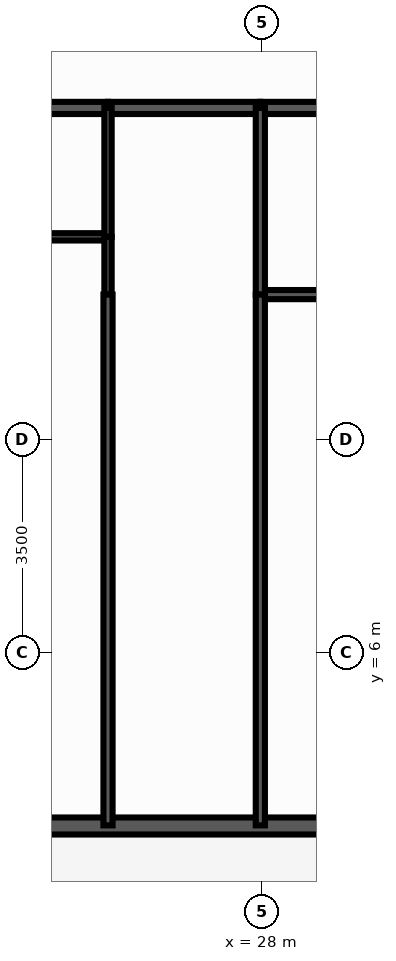
"""IFC4 building model, lengths in metres.
Left out: names, types, materials, properties, quantities, classifications, styles, units other than length and angle.
Written with IfcOpenShell. Run it as: python <this file> out.ifc"""

import sys

from ifc_helpers import new_model, si_unit, direction, frame, frame_2d, origin, origin_2d, place, context, subcontext, project, spatial, rectangle, extrude, source, transform, mapped, element, fill, save


model = new_model("IFC4")
c1 = context("Model", 3, precision=1e-05, world=origin(), true_north=direction((0.0, 1.0)))
c2 = subcontext(c1, "Body", "Model", "MODEL_VIEW")
j1 = project(units=[si_unit("LENGTHUNIT", "METRE"), si_unit("PLANEANGLEUNIT", "RADIAN")], contexts=[c1])
p1 = place(None, origin())
s1 = spatial("IfcSite", under=j1, at=p1, CompositionType="ELEMENT")
p2 = place(p1, origin())
s2 = spatial("IfcBuilding", under=s1, at=p2, CompositionType="ELEMENT")
p3 = place(p2, frame((0.0, 0.0, 19.4)))
s3 = spatial("IfcBuildingStorey", under=s2, at=p3, CompositionType="ELEMENT", Elevation=19.4)
p4 = place(p3, frame((15.5, 3.14, 0.0), z_axis=(0.0, 0.0, 1.0), x_axis=(1.0, 0.0, 0.0)))
e1 = element("IfcWall", 1, at=p4, inside=s3, PredefinedType="SOLIDWALL", context=c2, shape_type="SweptSolid", body=[
    extrude(rectangle(XDim=45.0, YDim=0.28, at=frame_2d((22.5, 0.0))), origin(), (0.0, 0.0, 1.0), 2.28),
])
p5 = place(p4, frame((0.785, 0.0, 0.25)))
e2 = element("IfcOpeningElement", 2, at=p5, cuts=e1, PredefinedType="OPENING", context=c2, shape_type="SweptSolid", body=[
    extrude(rectangle(XDim=1.2, YDim=1.5, at=frame_2d((0.6, 0.75))), frame((0.0, 0.152, 0.0), z_axis=(0.0, -1.0, 0.0), x_axis=(1.0, 0.0, 0.0)), (0.0, 0.0, 1.0), 0.304),
])
p6 = place(p4, frame((3.033, 0.0, 0.25)))
e3 = element("IfcOpeningElement", 3, at=p6, cuts=e1, PredefinedType="OPENING", context=c2, shape_type="SweptSolid", body=[
    extrude(rectangle(XDim=1.2, YDim=1.5, at=frame_2d((0.6, 0.75))), frame((0.0, 0.152, 0.0), z_axis=(0.0, -1.0, 0.0), x_axis=(1.0, 0.0, 0.0)), (0.0, 0.0, 1.0), 0.304),
])
p7 = place(p4, frame((5.727, 0.0, 0.25)))
e4 = element("IfcOpeningElement", 4, at=p7, cuts=e1, PredefinedType="OPENING", context=c2, shape_type="SweptSolid", body=[
    extrude(rectangle(XDim=1.2, YDim=1.5, at=frame_2d((0.6, 0.75))), frame((0.0, 0.152, 0.0), z_axis=(0.0, -1.0, 0.0), x_axis=(1.0, 0.0, 0.0)), (0.0, 0.0, 1.0), 0.304),
])
p8 = place(p4, frame((8.269, 0.0, 0.25)))
e5 = element("IfcOpeningElement", 5, at=p8, cuts=e1, PredefinedType="OPENING", context=c2, shape_type="SweptSolid", body=[
    extrude(rectangle(XDim=1.2, YDim=1.5, at=frame_2d((0.6, 0.75))), frame((0.0, 0.152, 0.0), z_axis=(0.0, -1.0, 0.0), x_axis=(1.0, 0.0, 0.0)), (0.0, 0.0, 1.0), 0.304),
])
p9 = place(p4, frame((10.621, 0.0, 0.25)))
e6 = element("IfcOpeningElement", 6, at=p9, cuts=e1, PredefinedType="OPENING", context=c2, shape_type="SweptSolid", body=[
    extrude(rectangle(XDim=1.2, YDim=1.5, at=frame_2d((0.6, 0.75))), frame((0.0, 0.152, 0.0), z_axis=(0.0, -1.0, 0.0), x_axis=(1.0, 0.0, 0.0)), (0.0, 0.0, 1.0), 0.304),
])
p10 = place(p4, frame((13.316, 0.0, 0.25)))
e7 = element("IfcOpeningElement", 7, at=p10, cuts=e1, PredefinedType="OPENING", context=c2, shape_type="SweptSolid", body=[
    extrude(rectangle(XDim=1.2, YDim=1.5, at=frame_2d((0.6, 0.75))), frame((0.0, 0.152, 0.0), z_axis=(0.0, -1.0, 0.0), x_axis=(1.0, 0.0, 0.0)), (0.0, 0.0, 1.0), 0.304),
])
p11 = place(p4, frame((16.624, 0.0, 0.25)))
e8 = element("IfcOpeningElement", 8, at=p11, cuts=e1, PredefinedType="OPENING", context=c2, shape_type="SweptSolid", body=[
    extrude(rectangle(XDim=0.7, YDim=1.5, at=frame_2d((0.35, 0.75))), frame((0.0, 0.152, 0.0), z_axis=(0.0, -1.0, 0.0), x_axis=(1.0, 0.0, 0.0)), (0.0, 0.0, 1.0), 0.304),
])
p12 = place(p4, frame((18.141, 0.0, 0.25)))
e9 = element("IfcOpeningElement", 9, at=p12, cuts=e1, PredefinedType="OPENING", context=c2, shape_type="SweptSolid", body=[
    extrude(rectangle(XDim=1.2, YDim=1.5, at=frame_2d((0.6, 0.75))), frame((0.0, 0.152, 0.0), z_axis=(0.0, -1.0, 0.0), x_axis=(1.0, 0.0, 0.0)), (0.0, 0.0, 1.0), 0.304),
])
p13 = place(p4, frame((21.874, 0.0, 0.0), z_axis=(0.0, 0.0, 1.0), x_axis=(-1.0, 0.0, 0.0)))
e10 = element("IfcOpeningElement", 10, at=p13, cuts=e1, PredefinedType="OPENING", context=c2, shape_type="SweptSolid", body=[
    extrude(rectangle(XDim=1.1, YDim=2.15, at=frame_2d((0.55, 1.075))), frame((0.0, 0.152, 0.0), z_axis=(0.0, -1.0, 0.0), x_axis=(1.0, 0.0, 0.0)), (0.0, 0.0, 1.0), 0.304),
])
p14 = place(p4, frame((23.223, 0.0, 0.25)))
e11 = element("IfcOpeningElement", 11, at=p14, cuts=e1, PredefinedType="OPENING", context=c2, shape_type="SweptSolid", body=[
    extrude(rectangle(XDim=1.2, YDim=1.5, at=frame_2d((0.6, 0.75))), frame((0.0, 0.152, 0.0), z_axis=(0.0, -1.0, 0.0), x_axis=(1.0, 0.0, 0.0)), (0.0, 0.0, 1.0), 0.304),
])
p15 = place(p4, frame((25.507, 0.0, 0.25)))
e12 = element("IfcOpeningElement", 12, at=p15, cuts=e1, PredefinedType="OPENING", context=c2, shape_type="SweptSolid", body=[
    extrude(rectangle(XDim=1.2, YDim=1.5, at=frame_2d((0.6, 0.75))), frame((0.0, 0.152, 0.0), z_axis=(0.0, -1.0, 0.0), x_axis=(1.0, 0.0, 0.0)), (0.0, 0.0, 1.0), 0.304),
])
p16 = place(p4, frame((27.6, 0.0, 0.25)))
e13 = element("IfcOpeningElement", 13, at=p16, cuts=e1, PredefinedType="OPENING", context=c2, shape_type="SweptSolid", body=[
    extrude(rectangle(XDim=0.7, YDim=1.5, at=frame_2d((0.35, 0.75))), frame((0.0, 0.152, 0.0), z_axis=(0.0, -1.0, 0.0), x_axis=(1.0, 0.0, 0.0)), (0.0, 0.0, 1.0), 0.304),
])
p17 = place(p4, frame((30.589, 0.0, 0.25)))
e14 = element("IfcOpeningElement", 14, at=p17, cuts=e1, PredefinedType="OPENING", context=c2, shape_type="SweptSolid", body=[
    extrude(rectangle(XDim=1.2, YDim=1.5, at=frame_2d((0.6, 0.75))), frame((0.0, 0.152, 0.0), z_axis=(0.0, -1.0, 0.0), x_axis=(1.0, 0.0, 0.0)), (0.0, 0.0, 1.0), 0.304),
])
p18 = place(p4, frame((32.872, 0.0, 0.25)))
e15 = element("IfcOpeningElement", 15, at=p18, cuts=e1, PredefinedType="OPENING", context=c2, shape_type="SweptSolid", body=[
    extrude(rectangle(XDim=1.2, YDim=1.5, at=frame_2d((0.6, 0.75))), frame((0.0, 0.152, 0.0), z_axis=(0.0, -1.0, 0.0), x_axis=(1.0, 0.0, 0.0)), (0.0, 0.0, 1.0), 0.304),
])
p19 = place(p4, frame((35.455, 0.0, 0.25)))
e16 = element("IfcOpeningElement", 16, at=p19, cuts=e1, PredefinedType="OPENING", context=c2, shape_type="SweptSolid", body=[
    extrude(rectangle(XDim=1.2, YDim=1.5, at=frame_2d((0.6, 0.75))), frame((0.0, 0.152, 0.0), z_axis=(0.0, -1.0, 0.0), x_axis=(1.0, 0.0, 0.0)), (0.0, 0.0, 1.0), 0.304),
])
p20 = place(p4, frame((37.954, 0.0, 0.25)))
e17 = element("IfcOpeningElement", 17, at=p20, cuts=e1, PredefinedType="OPENING", context=c2, shape_type="SweptSolid", body=[
    extrude(rectangle(XDim=1.2, YDim=1.5, at=frame_2d((0.6, 0.75))), frame((0.0, 0.152, 0.0), z_axis=(0.0, -1.0, 0.0), x_axis=(1.0, 0.0, 0.0)), (0.0, 0.0, 1.0), 0.304),
])
p21 = place(p4, frame((40.238, 0.0, 0.25)))
e18 = element("IfcOpeningElement", 18, at=p21, cuts=e1, PredefinedType="OPENING", context=c2, shape_type="SweptSolid", body=[
    extrude(rectangle(XDim=1.2, YDim=1.5, at=frame_2d((0.6, 0.75))), frame((0.0, 0.152, 0.0), z_axis=(0.0, -1.0, 0.0), x_axis=(1.0, 0.0, 0.0)), (0.0, 0.0, 1.0), 0.304),
])
p22 = place(p4, frame((42.716, 0.0, 0.25)))
e19 = element("IfcOpeningElement", 19, at=p22, cuts=e1, PredefinedType="OPENING", context=c2, shape_type="SweptSolid", body=[
    extrude(rectangle(XDim=1.2, YDim=1.5, at=frame_2d((0.6, 0.75))), frame((0.0, 0.152, 0.0), z_axis=(0.0, -1.0, 0.0), x_axis=(1.0, 0.0, 0.0)), (0.0, 0.0, 1.0), 0.304),
])
p23 = place(p3, frame((23.269, 14.95, 0.0), z_axis=(0.0, 0.0, 1.0), x_axis=(1.0, 0.0, 0.0)))
e20 = element("IfcWall", 20, at=p23, inside=s3, PredefinedType="PARTITIONING", context=c2, shape_type="SweptSolid", body=[
    extrude(rectangle(XDim=2.2, YDim=0.2, at=frame_2d((1.1, 0.0))), origin(), (0.0, 0.0, 1.0), 2.79),
])
p24 = place(p3, frame((25.469, 14.95, 0.0), z_axis=(0.0, 0.0, 1.0), x_axis=(1.0, 0.0, 0.0)))
e21 = element("IfcWall", 21, at=p24, inside=s3, PredefinedType="PARTITIONING", context=c2, shape_type="SweptSolid", body=[
    extrude(rectangle(XDim=2.505, YDim=0.2, at=frame_2d((1.252, 0.0))), origin(), (0.0, 0.0, 1.0), 2.79),
])
p25 = place(p24, frame((0.752, 0.0, 0.0)))
e22 = element("IfcOpeningElement", 22, at=p25, cuts=e21, PredefinedType="OPENING", context=c2, shape_type="SweptSolid", body=[
    extrude(rectangle(XDim=1.0, YDim=2.15, at=frame_2d((0.5, 1.075))), frame((0.0, 0.112, 0.0), z_axis=(0.0, -1.0, 0.0), x_axis=(1.0, 0.0, 0.0)), (0.0, 0.0, 1.0), 0.224),
])
p26 = place(p3, frame((27.974, 14.95, 0.0), z_axis=(0.0, 0.0, 1.0), x_axis=(1.0, 0.0, 0.0)))
e23 = element("IfcWall", 23, at=p26, inside=s3, PredefinedType="PARTITIONING", context=c2, shape_type="SweptSolid", body=[
    extrude(rectangle(XDim=2.884, YDim=0.2, at=frame_2d((1.442, 0.0))), origin(), (0.0, 0.0, 1.0), 2.79),
])
p27 = place(p3, frame((23.269, 12.83, 0.0), z_axis=(0.0, 0.0, 1.0), x_axis=(1.0, 0.0, 0.0)))
e24 = element("IfcWall", 24, at=p27, inside=s3, PredefinedType="PARTITIONING", context=c2, shape_type="SweptSolid", body=[
    extrude(rectangle(XDim=2.2, YDim=0.12, at=frame_2d((1.1, 0.0))), origin(), (0.0, 0.0, 1.0), 2.79),
])
p28 = place(p3, frame((27.974, 11.88, 0.0), z_axis=(0.0, 0.0, 1.0), x_axis=(1.0, 0.0, 0.0)))
e25 = element("IfcWall", 25, at=p28, inside=s3, PredefinedType="PARTITIONING", context=c2, shape_type="SweptSolid", body=[
    extrude(rectangle(XDim=2.884, YDim=0.15, at=frame_2d((1.442, 0.0))), origin(), (0.0, 0.0, 1.0), 2.79),
])
p29 = place(p3, frame((25.469, 14.95, 0.0), z_axis=(0.0, 0.0, 1.0), x_axis=(0.0, -1.0, 0.0)))
e26 = element("IfcWall", 26, at=p29, inside=s3, PredefinedType="PARTITIONING", context=c2, shape_type="SweptSolid", body=[
    extrude(rectangle(XDim=2.12, YDim=0.12, at=frame_2d((1.06, 0.0))), origin(), (0.0, 0.0, 1.0), 2.79),
])
p30 = place(p29, frame((0.635, 0.0, 0.0)))
e27 = element("IfcOpeningElement", 27, at=p30, cuts=e26, PredefinedType="OPENING", context=c2, shape_type="SweptSolid", body=[
    extrude(rectangle(XDim=0.85, YDim=2.05, at=frame_2d((0.425, 1.025))), frame((0.0, 0.072, 0.0), z_axis=(0.0, -1.0, 0.0), x_axis=(1.0, 0.0, 0.0)), (0.0, 0.0, 1.0), 0.144),
])
p31 = place(p3, frame((25.469, 12.83, 0.0), z_axis=(0.0, 0.0, 1.0), x_axis=(0.0, -1.0, 0.0)))
e28 = element("IfcWall", 28, at=p31, inside=s3, PredefinedType="PARTITIONING", context=c2, shape_type="SweptSolid", body=[
    extrude(rectangle(XDim=0.95, YDim=0.12, at=frame_2d((0.475, 0.0))), origin(), (0.0, 0.0, 1.0), 2.79),
])
p32 = place(p3, frame((25.469, 11.88, 0.0), z_axis=(0.0, 0.0, 1.0), x_axis=(0.0, -1.0, 0.0)))
e29 = element("IfcWall", 29, at=p32, inside=s3, PredefinedType="PARTITIONING", context=c2, shape_type="SweptSolid", body=[
    extrude(rectangle(XDim=8.73, YDim=0.15, at=frame_2d((4.365, 0.0))), origin(), (0.0, 0.0, 1.0), 2.79),
])
p33 = place(p32, frame((3.609, 0.0, 0.0)))
e30 = element("IfcOpeningElement", 30, at=p33, cuts=e29, PredefinedType="OPENING", context=c2, shape_type="SweptSolid", body=[
    extrude(rectangle(XDim=0.9, YDim=2.1, at=frame_2d((0.45, 1.05))), frame((0.0, 0.087, 0.0), z_axis=(0.0, -1.0, 0.0), x_axis=(1.0, 0.0, 0.0)), (0.0, 0.0, 1.0), 0.174),
])
p34 = place(p3, frame((27.974, 14.95, 0.0), z_axis=(0.0, 0.0, 1.0), x_axis=(0.0, -1.0, 0.0)))
e31 = element("IfcWall", 31, at=p34, inside=s3, PredefinedType="PARTITIONING", context=c2, shape_type="SweptSolid", body=[
    extrude(rectangle(XDim=3.07, YDim=0.15, at=frame_2d((1.535, 0.0))), origin(), (0.0, 0.0, 1.0), 2.79),
])
p35 = place(p34, frame((1.085, 0.0, 0.0)))
e32 = element("IfcOpeningElement", 32, at=p35, cuts=e31, PredefinedType="OPENING", context=c2, shape_type="SweptSolid", body=[
    extrude(rectangle(XDim=0.9, YDim=2.1, at=frame_2d((0.45, 1.05))), frame((0.0, 0.087, 0.0), z_axis=(0.0, -1.0, 0.0), x_axis=(1.0, 0.0, 0.0)), (0.0, 0.0, 1.0), 0.174),
])
p36 = place(p3, frame((27.974, 11.88, 0.0), z_axis=(0.0, 0.0, 1.0), x_axis=(0.0, -1.0, 0.0)))
e33 = element("IfcWall", 33, at=p36, inside=s3, PredefinedType="PARTITIONING", context=c2, shape_type="SweptSolid", body=[
    extrude(rectangle(XDim=8.73, YDim=0.15, at=frame_2d((4.365, 0.0))), origin(), (0.0, 0.0, 1.0), 2.79),
])
p37 = place(p36, frame((3.609, 0.0, 0.0)))
e34 = element("IfcOpeningElement", 34, at=p37, cuts=e33, PredefinedType="OPENING", context=c2, shape_type="SweptSolid", body=[
    extrude(rectangle(XDim=0.9, YDim=2.1, at=frame_2d((0.45, 1.05))), frame((0.0, 0.087, 0.0), z_axis=(0.0, -1.0, 0.0), x_axis=(1.0, 0.0, 0.0)), (0.0, 0.0, 1.0), 0.174),
])
p38 = place(p3, frame((0.0, 0.0, -0.32)))
p39 = place(p38, frame((28.0, 1.25, 0.0)))
p40 = place(p39, frame((0.0, 0.0, 0.27)))
e35 = element("IfcWindow", 35, at=p40, inside=s3, PartitioningType="SINGLE_PANEL", PredefinedType="SKYLIGHT", context=c2, shape_type="SweptSolid", body=[
    extrude(rectangle(XDim=2.2, YDim=2.2, at=origin_2d()), origin(), (0.0, 0.0, 1.0), 0.05),
])
m1 = source(origin(), c2, "Body", "SweptSolid", [
    extrude(rectangle(XDim=1.2, YDim=1.5, at=frame_2d((0.6, 0.75))), frame((0.0, 0.03, 0.0), z_axis=(0.0, -1.0, 0.0), x_axis=(1.0, 0.0, 0.0)), (0.0, 0.0, 1.0), 0.06),
])
p41 = place(p8, origin())
e36 = element("IfcWindow", 36, at=p41, inside=s3, PartitioningType="SINGLE_PANEL", PredefinedType="WINDOW", context=c2, shape_type="MappedRepresentation", body=[
    mapped(m1, transform((0.0, 0.0, 0.0), scale=1.0)),
])
fill(e5, e36)
p42 = place(p9, origin())
e37 = element("IfcWindow", 37, at=p42, inside=s3, PartitioningType="SINGLE_PANEL", PredefinedType="WINDOW", context=c2, shape_type="MappedRepresentation", body=[
    mapped(m1, transform((0.0, 0.0, 0.0), scale=1.0)),
])
fill(e6, e37)
p43 = place(p10, origin())
e38 = element("IfcWindow", 38, at=p43, inside=s3, PartitioningType="SINGLE_PANEL", PredefinedType="WINDOW", context=c2, shape_type="MappedRepresentation", body=[
    mapped(m1, transform((0.0, 0.0, 0.0), scale=1.0)),
])
fill(e7, e38)
m2 = source(origin(), c2, "Body", "SweptSolid", [
    extrude(rectangle(XDim=1.0, YDim=2.15, at=frame_2d((0.5, 1.075))), frame((0.0, 0.025, 0.0), z_axis=(0.0, -1.0, 0.0), x_axis=(1.0, 0.0, 0.0)), (0.0, 0.0, 1.0), 0.05),
])
p44 = place(p25, origin())
e39 = element("IfcDoor", 39, at=p44, inside=s3, OperationType="SINGLE_SWING_RIGHT", PredefinedType="DOOR", context=c2, shape_type="MappedRepresentation", body=[
    mapped(m2, transform((0.0, 0.0, 0.0), scale=1.0)),
])
fill(e22, e39)
m3 = source(origin(), c2, "Body", "SweptSolid", [
    extrude(rectangle(XDim=0.85, YDim=2.05, at=frame_2d((0.425, 1.025))), frame((0.0, 0.025, 0.0), z_axis=(0.0, -1.0, 0.0), x_axis=(1.0, 0.0, 0.0)), (0.0, 0.0, 1.0), 0.05),
])
p45 = place(p30, origin())
e40 = element("IfcDoor", 40, at=p45, inside=s3, OperationType="SINGLE_SWING_LEFT", PredefinedType="DOOR", context=c2, shape_type="MappedRepresentation", body=[
    mapped(m3, transform((0.0, 0.0, 0.0), scale=1.0)),
])
fill(e27, e40)
m4 = source(origin(), c2, "Body", "SweptSolid", [
    extrude(rectangle(XDim=0.9, YDim=2.1, at=frame_2d((0.45, 1.05))), frame((0.0, 0.025, 0.0), z_axis=(0.0, -1.0, 0.0), x_axis=(1.0, 0.0, 0.0)), (0.0, 0.0, 1.0), 0.05),
])
p46 = place(p33, origin())
e41 = element("IfcDoor", 41, at=p46, inside=s3, OperationType="SINGLE_SWING_RIGHT", PredefinedType="DOOR", context=c2, shape_type="MappedRepresentation", body=[
    mapped(m4, transform((0.0, 0.0, 0.0), scale=1.0)),
])
fill(e30, e41)
p47 = place(p35, origin())
e42 = element("IfcDoor", 42, at=p47, inside=s3, OperationType="SINGLE_SWING_LEFT", PredefinedType="DOOR", context=c2, shape_type="MappedRepresentation", body=[
    mapped(m4, transform((0.0, 0.0, 0.0), scale=1.0)),
])
fill(e32, e42)
p48 = place(p37, origin())
e43 = element("IfcDoor", 43, at=p48, inside=s3, OperationType="SINGLE_SWING_RIGHT", PredefinedType="DOOR", context=c2, shape_type="MappedRepresentation", body=[
    mapped(m4, transform((0.0, 0.0, 0.0), scale=1.0)),
])
fill(e34, e43)
save(model, sys.argv[1])
